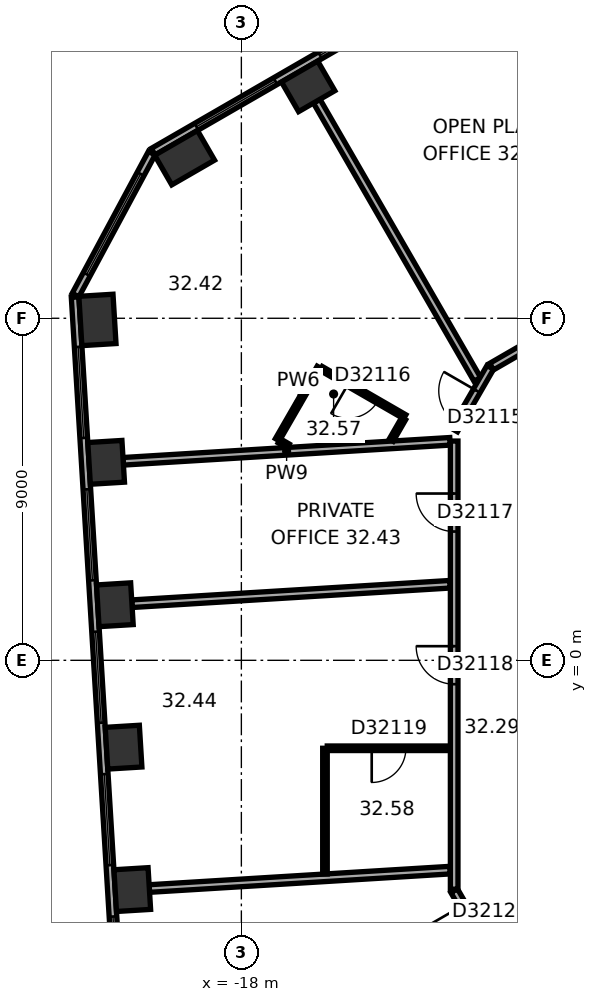
"""IFC4 building model, lengths in metres.
Left out: names, types, materials, properties, quantities, classifications, styles, units other than length and angle.
Written with IfcOpenShell. Run it as: python <this file> out.ifc"""

import sys

from ifc_helpers import new_model, si_unit, direction, frame, frame_2d, origin, origin_2d, place, context, subcontext, project, spatial, rectangle, extrude, element, fill, save


model = new_model("IFC4")
c1 = context("Model", 3, precision=1e-05, world=origin(), true_north=direction((0.0, 1.0)))
c2 = subcontext(c1, "Body", "Model", "MODEL_VIEW")
j1 = project(units=[si_unit("LENGTHUNIT", "METRE"), si_unit("PLANEANGLEUNIT", "RADIAN")], contexts=[c1])
p1 = place(None, origin())
s1 = spatial("IfcSite", under=j1, at=p1, CompositionType="ELEMENT")
p2 = place(p1, origin())
s2 = spatial("IfcBuilding", under=s1, at=p2, CompositionType="ELEMENT")
p3 = place(p2, frame((0.0, 0.0, 131.8)))
s3 = spatial("IfcBuildingStorey", under=s2, at=p3, CompositionType="ELEMENT", Elevation=131.8)
p4 = place(p3, frame((-16.242, 15.102, 0.0), z_axis=(0.0, 0.0, 1.0), x_axis=(-0.866025403784, -0.5, 0.0)))
e1 = element("IfcColumn", 1, at=p4, inside=s3, PredefinedType="COLUMN", context=c2, shape_type="SweptSolid", body=[
    extrude(rectangle(XDim=1.1, YDim=0.9, at=origin_2d()), origin(), (0.0, 0.0, 1.0), 3.7),
])
for number, where, z_axis, x_axis in (
    (2, (-19.494, 13.225, 0.0), (0.0, 0.0, 1.0), (-0.866, -0.5, 0.0)),
    (3, (-21.787, 8.956, 0.0), (0.0, 0.0, 1.0), (0.061, -0.998, 0.0)),
):
    element("IfcColumn", number, at=place(p3, frame(where, z_axis=z_axis, x_axis=x_axis)), inside=s3, PredefinedType="COLUMN", context=c2, shape_type="SweptSolid", body=[
        extrude(rectangle(XDim=1.3, YDim=0.9, at=origin_2d()), origin(), (0.0, 0.0, 1.0), 3.7),
    ])
for number, where, z_axis, x_axis in (
    (4, (-21.558, 5.209, 0.0), (0.0, 0.0, 1.0), (0.061, -0.998, 0.0)),
    (5, (-21.329, 1.462, 0.0), (0.0, 0.0, 1.0), (0.061, -0.998, 0.0)),
    (6, (-21.1, -2.285, 0.0), (0.0, 0.0, 1.0), (0.061, -0.998, 0.0)),
    (7, (-20.871, -6.032, 0.0), (0.0, 0.0, 1.0), (0.061, -0.998, 0.0)),
):
    element("IfcColumn", number, at=place(p3, frame(where, z_axis=z_axis, x_axis=x_axis)), inside=s3, PredefinedType="COLUMN", context=c2, shape_type="SweptSolid", body=[
        extrude(rectangle(XDim=1.1, YDim=0.9, at=origin_2d()), origin(), (0.0, 0.0, 1.0), 3.7),
    ])
p5 = place(p3, frame((-2.961, 23.405, 0.0), z_axis=(0.0, 0.0, 1.0), x_axis=(-0.866023315909, -0.500003616288, 0.0)))
e8 = element("IfcWall", 8, at=p5, inside=s3, PredefinedType="STANDARD", context=c2, shape_type="SweptSolid", body=[
    extrude(rectangle(XDim=20.044, YDim=0.2, at=frame_2d((10.022, 0.0))), origin(), (0.0, 0.0, 1.0), 3.7),
])
p6 = place(p5, frame((1.314, 0.0, 0.9)))
e9 = element("IfcOpeningElement", 9, at=p6, cuts=e8, PredefinedType="OPENING", context=c2, shape_type="SweptSolid", body=[
    extrude(rectangle(XDim=2.4, YDim=2.0, at=frame_2d((1.2, 1.0))), frame((0.0, 0.11, 0.0), z_axis=(0.0, -1.0, 0.0), x_axis=(1.0, 0.0, 0.0)), (0.0, 0.0, 1.0), 0.22),
])
p7 = place(p5, frame((5.069, 0.0, 0.9)))
e10 = element("IfcOpeningElement", 10, at=p7, cuts=e8, PredefinedType="OPENING", context=c2, shape_type="SweptSolid", body=[
    extrude(rectangle(XDim=2.4, YDim=2.0, at=frame_2d((1.2, 1.0))), frame((0.0, 0.11, 0.0), z_axis=(0.0, -1.0, 0.0), x_axis=(1.0, 0.0, 0.0)), (0.0, 0.0, 1.0), 0.22),
])
p8 = place(p5, frame((8.823, 0.0, 0.9)))
e11 = element("IfcOpeningElement", 11, at=p8, cuts=e8, PredefinedType="OPENING", context=c2, shape_type="SweptSolid", body=[
    extrude(rectangle(XDim=2.4, YDim=2.0, at=frame_2d((1.2, 1.0))), frame((0.0, 0.11, 0.0), z_axis=(0.0, -1.0, 0.0), x_axis=(1.0, 0.0, 0.0)), (0.0, 0.0, 1.0), 0.22),
])
p9 = place(p5, frame((12.577, 0.0, 0.9)))
e12 = element("IfcOpeningElement", 12, at=p9, cuts=e8, PredefinedType="OPENING", context=c2, shape_type="SweptSolid", body=[
    extrude(rectangle(XDim=2.4, YDim=2.0, at=frame_2d((1.2, 1.0))), frame((0.0, 0.11, 0.0), z_axis=(0.0, -1.0, 0.0), x_axis=(1.0, 0.0, 0.0)), (0.0, 0.0, 1.0), 0.22),
])
p10 = place(p5, frame((16.331, 0.0, 0.9)))
e13 = element("IfcOpeningElement", 13, at=p10, cuts=e8, PredefinedType="OPENING", context=c2, shape_type="SweptSolid", body=[
    extrude(rectangle(XDim=2.4, YDim=2.0, at=frame_2d((1.2, 1.0))), frame((0.0, 0.11, 0.0), z_axis=(0.0, -1.0, 0.0), x_axis=(1.0, 0.0, 0.0)), (0.0, 0.0, 1.0), 0.22),
])
p11 = place(p3, frame((-20.357, 13.344, 0.0), z_axis=(0.0, 0.0, 1.0), x_axis=(-0.473288913494, -0.880907262068, 0.0)))
e14 = element("IfcWall", 14, at=p11, inside=s3, PredefinedType="STANDARD", context=c2, shape_type="SweptSolid", body=[
    extrude(rectangle(XDim=4.238, YDim=0.2, at=frame_2d((2.119, 0.0))), origin(), (0.0, 0.0, 1.0), 3.7),
])
p12 = place(p11, frame((0.619, 0.0, 0.9)))
e15 = element("IfcOpeningElement", 15, at=p12, cuts=e14, PredefinedType="OPENING", context=c2, shape_type="SweptSolid", body=[
    extrude(rectangle(XDim=3.0, YDim=2.0, at=frame_2d((1.5, 1.0))), frame((0.0, 0.11, 0.0), z_axis=(0.0, -1.0, 0.0), x_axis=(1.0, 0.0, 0.0)), (0.0, 0.0, 1.0), 0.22),
])
p13 = place(p3, frame((-22.375, 9.557, 0.0), z_axis=(0.0, 0.0, 1.0), x_axis=(0.061036015339, -0.998135564356, 0.0)))
e16 = element("IfcWall", 16, at=p13, inside=s3, PredefinedType="STANDARD", context=c2, shape_type="SweptSolid", body=[
    extrude(rectangle(XDim=20.044, YDim=0.2, at=frame_2d((10.022, 0.0))), origin(), (0.0, 0.0, 1.0), 3.7),
])
p14 = place(p13, frame((1.313, 0.0, 0.9)))
e17 = element("IfcOpeningElement", 17, at=p14, cuts=e16, PredefinedType="OPENING", context=c2, shape_type="SweptSolid", body=[
    extrude(rectangle(XDim=2.4, YDim=2.0, at=frame_2d((1.2, 1.0))), frame((0.0, 0.11, 0.0), z_axis=(0.0, -1.0, 0.0), x_axis=(1.0, 0.0, 0.0)), (0.0, 0.0, 1.0), 0.22),
])
p15 = place(p13, frame((5.067, 0.0, 0.9)))
e18 = element("IfcOpeningElement", 18, at=p15, cuts=e16, PredefinedType="OPENING", context=c2, shape_type="SweptSolid", body=[
    extrude(rectangle(XDim=2.4, YDim=2.0, at=frame_2d((1.2, 1.0))), frame((0.0, 0.11, 0.0), z_axis=(0.0, -1.0, 0.0), x_axis=(1.0, 0.0, 0.0)), (0.0, 0.0, 1.0), 0.22),
])
p16 = place(p13, frame((8.821, 0.0, 0.9)))
e19 = element("IfcOpeningElement", 19, at=p16, cuts=e16, PredefinedType="OPENING", context=c2, shape_type="SweptSolid", body=[
    extrude(rectangle(XDim=2.4, YDim=2.0, at=frame_2d((1.2, 1.0))), frame((0.0, 0.11, 0.0), z_axis=(0.0, -1.0, 0.0), x_axis=(1.0, 0.0, 0.0)), (0.0, 0.0, 1.0), 0.22),
])
p17 = place(p13, frame((12.575, 0.0, 0.9)))
e20 = element("IfcOpeningElement", 20, at=p17, cuts=e16, PredefinedType="OPENING", context=c2, shape_type="SweptSolid", body=[
    extrude(rectangle(XDim=2.4, YDim=2.0, at=frame_2d((1.2, 1.0))), frame((0.0, 0.11, 0.0), z_axis=(0.0, -1.0, 0.0), x_axis=(1.0, 0.0, 0.0)), (0.0, 0.0, 1.0), 0.22),
])
p18 = place(p13, frame((16.329, 0.0, 0.9)))
e21 = element("IfcOpeningElement", 21, at=p18, cuts=e16, PredefinedType="OPENING", context=c2, shape_type="SweptSolid", body=[
    extrude(rectangle(XDim=2.4, YDim=2.0, at=frame_2d((1.2, 1.0))), frame((0.0, 0.11, 0.0), z_axis=(0.0, -1.0, 0.0), x_axis=(1.0, 0.0, 0.0)), (0.0, 0.0, 1.0), 0.22),
])
p19 = place(p3, frame((-21.109, 5.237, 0.0), z_axis=(0.0, 0.0, 1.0), x_axis=(0.998135264293, 0.061040922131, 0.0)))
e22 = element("IfcWall", 22, at=p19, inside=s3, PredefinedType="PARTITIONING", context=c2, shape_type="SweptSolid", body=[
    extrude(rectangle(XDim=8.615, YDim=0.2, at=frame_2d((4.308, 0.0))), origin(), (0.0, 0.0, 1.0), 3.42),
])
p20 = place(p3, frame((-20.88, 1.49, 0.0), z_axis=(0.0, 0.0, 1.0), x_axis=(0.998136393419, 0.061022455974, 0.0)))
e23 = element("IfcWall", 23, at=p20, inside=s3, PredefinedType="PARTITIONING", context=c2, shape_type="SweptSolid", body=[
    extrude(rectangle(XDim=8.386, YDim=0.2, at=frame_2d((4.193, 0.0))), origin(), (0.0, 0.0, 1.0), 2.87),
])
p21 = place(p3, frame((-20.421, -6.005, 0.0), z_axis=(0.0, 0.0, 1.0), x_axis=(0.998134865741, 0.061047438866, 0.0)))
e24 = element("IfcWall", 24, at=p21, inside=s3, PredefinedType="PARTITIONING", context=c2, shape_type="SweptSolid", body=[
    extrude(rectangle(XDim=7.927, YDim=0.2, at=frame_2d((3.963, 0.0))), origin(), (0.0, 0.0, 1.0), 2.87),
])
p22 = place(p3, frame((-17.052, 5.804, 0.0), z_axis=(0.0, 0.0, 1.0), x_axis=(0.50002983664, 0.866008176907, 0.0)))
e25 = element("IfcWall", 25, at=p22, inside=s3, PredefinedType="PARTITIONING", context=c2, shape_type="SweptSolid", body=[
    extrude(rectangle(XDim=2.2, YDim=0.12, at=frame_2d((1.1, 0.0))), origin(), (0.0, 0.0, 1.0), 3.42),
])
p23 = place(p3, frame((-16.769, 5.64, 0.0), z_axis=(0.0, 0.0, 1.0), x_axis=(-0.865926680471, 0.500170954823, 0.0)))
e26 = element("IfcWall", 26, at=p23, inside=s3, PredefinedType="PARTITIONING", context=c2, shape_type="SweptSolid", body=[
    extrude(rectangle(XDim=0.267, YDim=0.12, at=frame_2d((0.134, 0.0))), origin(), (0.0, 0.0, 1.0), 3.42),
])
p24 = place(p3, frame((-16.018, 14.712, 0.0), z_axis=(0.0, 0.0, 1.0), x_axis=(0.500000843414, -0.866024916838, 0.0)))
e27 = element("IfcWall", 27, at=p24, inside=s3, PredefinedType="PARTITIONING", context=c2, shape_type="SweptSolid", body=[
    extrude(rectangle(XDim=8.452, YDim=0.2, at=frame_2d((4.226, 0.0))), origin(), (0.0, 0.0, 1.0), 3.42),
])
p25 = place(p3, frame((-15.9, 7.679, 0.0), z_axis=(0.0, 0.0, 1.0), x_axis=(0.866022320763, -0.500005339912, 0.0)))
e28 = element("IfcWall", 28, at=p25, inside=s3, PredefinedType="PARTITIONING", context=c2, shape_type="SweptSolid", body=[
    extrude(rectangle(XDim=2.54, YDim=0.12, at=frame_2d((1.27, 0.0))), origin(), (0.0, 0.0, 1.0), 3.42),
])
p26 = place(p25, frame((0.82, 0.0, 0.0)))
e29 = element("IfcOpeningElement", 29, at=p26, cuts=e28, PredefinedType="OPENING", context=c2, shape_type="SweptSolid", body=[
    extrude(rectangle(XDim=0.9, YDim=2.1, at=frame_2d((0.45, 1.05))), frame((0.0, 0.07, 0.0), z_axis=(0.0, -1.0, 0.0), x_axis=(1.0, 0.0, 0.0)), (0.0, 0.0, 1.0), 0.14),
])
p27 = place(p3, frame((-15.8, -5.622, 0.0), z_axis=(0.0, 0.0, 1.0), x_axis=(0.0, 1.0, 0.0)))
e30 = element("IfcWall", 30, at=p27, inside=s3, PredefinedType="PARTITIONING", context=c2, shape_type="SweptSolid", body=[
    extrude(rectangle(XDim=3.308, YDim=0.12, at=frame_2d((1.654, 0.0))), origin(), (0.0, 0.0, 1.0), 3.42),
])
p28 = place(p3, frame((-15.74, -2.314, 0.0), z_axis=(0.0, 0.0, 1.0), x_axis=(1.0, 0.0, 0.0)))
e31 = element("IfcWall", 31, at=p28, inside=s3, PredefinedType="PARTITIONING", context=c2, shape_type="SweptSolid", body=[
    extrude(rectangle(XDim=3.24, YDim=0.12, at=frame_2d((1.62, 0.0))), origin(), (0.0, 0.0, 1.0), 3.42),
])
p29 = place(p28, frame((1.17, 0.0, 0.0)))
e32 = element("IfcOpeningElement", 32, at=p29, cuts=e31, PredefinedType="OPENING", context=c2, shape_type="SweptSolid", body=[
    extrude(rectangle(XDim=0.9, YDim=2.1, at=frame_2d((0.45, 1.05))), frame((0.0, 0.07, 0.0), z_axis=(0.0, -1.0, 0.0), x_axis=(1.0, 0.0, 0.0)), (0.0, 0.0, 1.0), 0.14),
])
p30 = place(p3, frame((-13.731, 6.357, 0.0), z_axis=(0.0, 0.0, 1.0), x_axis=(-0.500090215447, -0.865973311606, 0.0)))
e33 = element("IfcWall", 33, at=p30, inside=s3, PredefinedType="PARTITIONING", context=c2, shape_type="SweptSolid", body=[
    extrude(rectangle(XDim=0.651, YDim=0.12, at=frame_2d((0.326, 0.0))), origin(), (0.0, 0.0, 1.0), 3.42),
])
p31 = place(p3, frame((-12.4, -6.062, 0.0), z_axis=(0.0, 0.0, 1.0), x_axis=(0.500022797313, -0.86601224135, 0.0)))
e34 = element("IfcWall", 34, at=p31, inside=s3, PredefinedType="PARTITIONING", context=c2, shape_type="SweptSolid", body=[
    extrude(rectangle(XDim=1.9, YDim=0.2, at=frame_2d((0.95, 0.0))), origin(), (0.0, 0.0, 1.0), 3.42),
])
p32 = place(p31, frame((0.45, 0.0, 0.0)))
e35 = element("IfcOpeningElement", 35, at=p32, cuts=e34, PredefinedType="OPENING", context=c2, shape_type="SweptSolid", body=[
    extrude(rectangle(XDim=1.0, YDim=2.1, at=frame_2d((0.5, 1.05))), frame((0.0, 0.11, 0.0), z_axis=(0.0, -1.0, 0.0), x_axis=(1.0, 0.0, 0.0)), (0.0, 0.0, 1.0), 0.22),
])
p33 = place(p3, frame((-12.4, 5.769, 0.0), z_axis=(0.0, 0.0, 1.0), x_axis=(0.0, -1.0, 0.0)))
e36 = element("IfcWall", 36, at=p33, inside=s3, PredefinedType="PARTITIONING", context=c2, shape_type="SweptSolid", body=[
    extrude(rectangle(XDim=11.792, YDim=0.2, at=frame_2d((5.896, 0.0))), origin(), (0.0, 0.0, 1.0), 3.42),
])
p34 = place(p33, frame((1.381, 0.0, 0.0)))
e37 = element("IfcOpeningElement", 37, at=p34, cuts=e36, PredefinedType="OPENING", context=c2, shape_type="SweptSolid", body=[
    extrude(rectangle(XDim=1.0, YDim=2.1, at=frame_2d((0.5, 1.05))), frame((0.0, 0.11, 0.0), z_axis=(0.0, -1.0, 0.0), x_axis=(1.0, 0.0, 0.0)), (0.0, 0.0, 1.0), 0.22),
])
p35 = place(p33, frame((5.397, 0.0, 0.0)))
e38 = element("IfcOpeningElement", 38, at=p35, cuts=e36, PredefinedType="OPENING", context=c2, shape_type="SweptSolid", body=[
    extrude(rectangle(XDim=1.0, YDim=2.1, at=frame_2d((0.5, 1.05))), frame((0.0, 0.11, 0.0), z_axis=(0.0, -1.0, 0.0), x_axis=(1.0, 0.0, 0.0)), (0.0, 0.0, 1.0), 0.22),
])
p36 = place(p3, frame((-11.45, 7.708, 0.0), z_axis=(0.0, 0.0, 1.0), x_axis=(-0.500022797313, -0.86601224135, 0.0)))
e39 = element("IfcWall", 39, at=p36, inside=s3, PredefinedType="PARTITIONING", context=c2, shape_type="SweptSolid", body=[
    extrude(rectangle(XDim=1.9, YDim=0.2, at=frame_2d((0.95, 0.0))), origin(), (0.0, 0.0, 1.0), 3.42),
])
p37 = place(p36, frame((0.712, 0.0, 0.0)))
e40 = element("IfcOpeningElement", 40, at=p37, cuts=e39, PredefinedType="OPENING", context=c2, shape_type="SweptSolid", body=[
    extrude(rectangle(XDim=1.0, YDim=2.1, at=frame_2d((0.5, 1.05))), frame((0.0, 0.11, 0.0), z_axis=(0.0, -1.0, 0.0), x_axis=(1.0, 0.0, 0.0)), (0.0, 0.0, 1.0), 0.22),
])
p38 = place(p3, frame((-4.209, 11.888, 0.0), z_axis=(0.0, 0.0, 1.0), x_axis=(-0.866020930448, -0.500007747966, 0.0)))
e41 = element("IfcWall", 41, at=p38, inside=s3, PredefinedType="PARTITIONING", context=c2, shape_type="SweptSolid", body=[
    extrude(rectangle(XDim=8.321, YDim=0.2, at=frame_2d((4.161, 0.0))), origin(), (0.0, 0.0, 1.0), 3.42),
])
p39 = place(p38, frame((5.439, 0.0, 0.0)))
e42 = element("IfcOpeningElement", 42, at=p39, cuts=e41, PredefinedType="OPENING", context=c2, shape_type="SweptSolid", body=[
    extrude(rectangle(XDim=1.0, YDim=2.1, at=frame_2d((0.5, 1.05))), frame((0.0, 0.11, 0.0), z_axis=(0.0, -1.0, 0.0), x_axis=(1.0, 0.0, 0.0)), (0.0, 0.0, 1.0), 0.22),
])
p40 = place(p9, origin())
e43 = element("IfcWindow", 43, at=p40, inside=s3, PartitioningType="SINGLE_PANEL", PredefinedType="WINDOW", context=c2, shape_type="SweptSolid", body=[
    extrude(rectangle(XDim=2.4, YDim=2.0, at=frame_2d((1.2, 1.0))), frame((0.0, 0.03, 0.0), z_axis=(0.0, -1.0, 0.0), x_axis=(1.0, 0.0, 0.0)), (0.0, 0.0, 1.0), 0.06),
])
fill(e12, e43)
p41 = place(p10, origin())
e44 = element("IfcWindow", 44, at=p41, inside=s3, PartitioningType="SINGLE_PANEL", PredefinedType="WINDOW", context=c2, shape_type="SweptSolid", body=[
    extrude(rectangle(XDim=2.4, YDim=2.0, at=frame_2d((1.2, 1.0))), frame((0.0, 0.03, 0.0), z_axis=(0.0, -1.0, 0.0), x_axis=(1.0, 0.0, 0.0)), (0.0, 0.0, 1.0), 0.06),
])
fill(e13, e44)
p42 = place(p12, origin())
e45 = element("IfcWindow", 45, at=p42, inside=s3, PartitioningType="SINGLE_PANEL", PredefinedType="WINDOW", context=c2, shape_type="SweptSolid", body=[
    extrude(rectangle(XDim=3.0, YDim=2.0, at=frame_2d((1.5, 1.0))), frame((0.0, 0.03, 0.0), z_axis=(0.0, -1.0, 0.0), x_axis=(1.0, 0.0, 0.0)), (0.0, 0.0, 1.0), 0.06),
])
fill(e15, e45)
p43 = place(p14, origin())
e46 = element("IfcWindow", 46, at=p43, inside=s3, PartitioningType="SINGLE_PANEL", PredefinedType="WINDOW", context=c2, shape_type="SweptSolid", body=[
    extrude(rectangle(XDim=2.4, YDim=2.0, at=frame_2d((1.2, 1.0))), frame((0.0, 0.03, 0.0), z_axis=(0.0, -1.0, 0.0), x_axis=(1.0, 0.0, 0.0)), (0.0, 0.0, 1.0), 0.06),
])
fill(e17, e46)
p44 = place(p15, origin())
e47 = element("IfcWindow", 47, at=p44, inside=s3, PartitioningType="SINGLE_PANEL", PredefinedType="WINDOW", context=c2, shape_type="SweptSolid", body=[
    extrude(rectangle(XDim=2.4, YDim=2.0, at=frame_2d((1.2, 1.0))), frame((0.0, 0.03, 0.0), z_axis=(0.0, -1.0, 0.0), x_axis=(1.0, 0.0, 0.0)), (0.0, 0.0, 1.0), 0.06),
])
fill(e18, e47)
p45 = place(p16, origin())
e48 = element("IfcWindow", 48, at=p45, inside=s3, PartitioningType="SINGLE_PANEL", PredefinedType="WINDOW", context=c2, shape_type="SweptSolid", body=[
    extrude(rectangle(XDim=2.4, YDim=2.0, at=frame_2d((1.2, 1.0))), frame((0.0, 0.03, 0.0), z_axis=(0.0, -1.0, 0.0), x_axis=(1.0, 0.0, 0.0)), (0.0, 0.0, 1.0), 0.06),
])
fill(e19, e48)
p46 = place(p17, origin())
e49 = element("IfcWindow", 49, at=p46, inside=s3, PartitioningType="SINGLE_PANEL", PredefinedType="WINDOW", context=c2, shape_type="SweptSolid", body=[
    extrude(rectangle(XDim=2.4, YDim=2.0, at=frame_2d((1.2, 1.0))), frame((0.0, 0.03, 0.0), z_axis=(0.0, -1.0, 0.0), x_axis=(1.0, 0.0, 0.0)), (0.0, 0.0, 1.0), 0.06),
])
fill(e20, e49)
p47 = place(p18, origin())
e50 = element("IfcWindow", 50, at=p47, inside=s3, PartitioningType="SINGLE_PANEL", PredefinedType="WINDOW", context=c2, shape_type="SweptSolid", body=[
    extrude(rectangle(XDim=2.4, YDim=2.0, at=frame_2d((1.2, 1.0))), frame((0.0, 0.03, 0.0), z_axis=(0.0, -1.0, 0.0), x_axis=(1.0, 0.0, 0.0)), (0.0, 0.0, 1.0), 0.06),
])
fill(e21, e50)
p48 = place(p37, origin())
e51 = element("IfcDoor", 51, at=p48, inside=s3, OperationType="SINGLE_SWING_LEFT", PredefinedType="DOOR", context=c2, shape_type="SweptSolid", body=[
    extrude(rectangle(XDim=1.0, YDim=2.1, at=frame_2d((0.5, 1.05))), frame((0.0, 0.025, 0.0), z_axis=(0.0, -1.0, 0.0), x_axis=(1.0, 0.0, 0.0)), (0.0, 0.0, 1.0), 0.05),
])
fill(e40, e51)
p49 = place(p26, origin())
e52 = element("IfcDoor", 52, at=p49, inside=s3, OperationType="SINGLE_SWING_LEFT", PredefinedType="DOOR", context=c2, shape_type="SweptSolid", body=[
    extrude(rectangle(XDim=0.9, YDim=2.1, at=frame_2d((0.45, 1.05))), frame((0.0, 0.025, 0.0), z_axis=(0.0, -1.0, 0.0), x_axis=(1.0, 0.0, 0.0)), (0.0, 0.0, 1.0), 0.05),
])
fill(e29, e52)
p50 = place(p34, origin())
e53 = element("IfcDoor", 53, at=p50, inside=s3, OperationType="SINGLE_SWING_LEFT", PredefinedType="DOOR", context=c2, shape_type="SweptSolid", body=[
    extrude(rectangle(XDim=1.0, YDim=2.1, at=frame_2d((0.5, 1.05))), frame((0.0, 0.025, 0.0), z_axis=(0.0, -1.0, 0.0), x_axis=(1.0, 0.0, 0.0)), (0.0, 0.0, 1.0), 0.05),
])
fill(e37, e53)
p51 = place(p35, origin())
e54 = element("IfcDoor", 54, at=p51, inside=s3, OperationType="SINGLE_SWING_LEFT", PredefinedType="DOOR", context=c2, shape_type="SweptSolid", body=[
    extrude(rectangle(XDim=1.0, YDim=2.1, at=frame_2d((0.5, 1.05))), frame((0.0, 0.025, 0.0), z_axis=(0.0, -1.0, 0.0), x_axis=(1.0, 0.0, 0.0)), (0.0, 0.0, 1.0), 0.05),
])
fill(e38, e54)
p52 = place(p29, origin())
e55 = element("IfcDoor", 55, at=p52, inside=s3, OperationType="SINGLE_SWING_LEFT", PredefinedType="DOOR", context=c2, shape_type="SweptSolid", body=[
    extrude(rectangle(XDim=0.9, YDim=2.1, at=frame_2d((0.45, 1.05))), frame((0.0, 0.025, 0.0), z_axis=(0.0, -1.0, 0.0), x_axis=(1.0, 0.0, 0.0)), (0.0, 0.0, 1.0), 0.05),
])
fill(e32, e55)
p53 = place(p32, origin())
e56 = element("IfcDoor", 56, at=p53, inside=s3, OperationType="SINGLE_SWING_LEFT", PredefinedType="DOOR", context=c2, shape_type="SweptSolid", body=[
    extrude(rectangle(XDim=1.0, YDim=2.1, at=frame_2d((0.5, 1.05))), frame((0.0, 0.025, 0.0), z_axis=(0.0, -1.0, 0.0), x_axis=(1.0, 0.0, 0.0)), (0.0, 0.0, 1.0), 0.05),
])
fill(e35, e56)
save(model, sys.argv[1])
